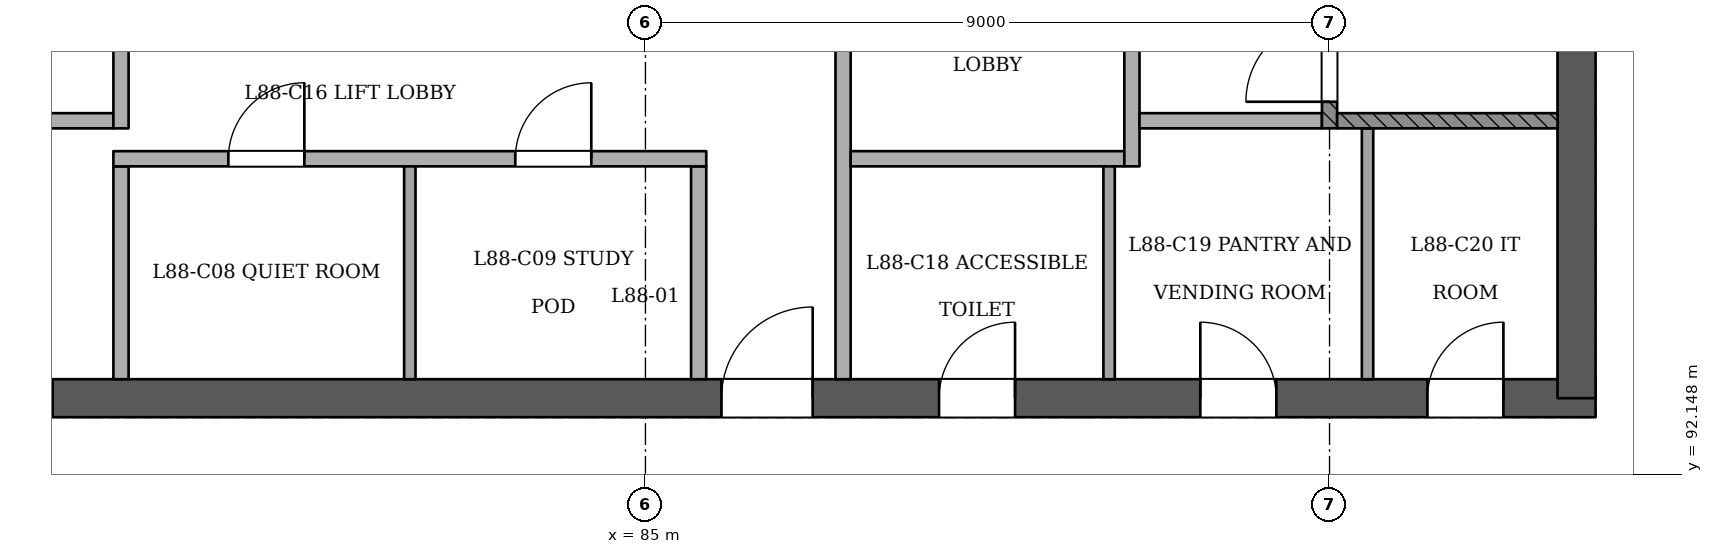
"""IFC4 building model, lengths in metres.
Left out: names, types, materials, properties, quantities, classifications, styles, units other than length and angle.
Written with IfcOpenShell. Run it as: python <this file> out.ifc"""

import sys

from ifc_helpers import new_model, si_unit, direction, frame, frame_2d, origin, place, context, subcontext, project, spatial, rectangle, extrude, element, fill, save


model = new_model("IFC4")
c1 = context("Model", 3, precision=1e-05, world=origin(), true_north=direction((0.0, 1.0)))
c2 = subcontext(c1, "Body", "Model", "MODEL_VIEW")
j1 = project(units=[si_unit("LENGTHUNIT", "METRE"), si_unit("PLANEANGLEUNIT", "RADIAN")], contexts=[c1])
p1 = place(None, origin())
s1 = spatial("IfcSite", under=j1, at=p1, CompositionType="ELEMENT")
p2 = place(p1, origin())
s2 = spatial("IfcBuilding", under=s1, at=p2, CompositionType="ELEMENT")
p3 = place(p2, frame((0.0, 0.0, 338.8)))
s3 = spatial("IfcBuildingStorey", under=s2, at=p3, CompositionType="ELEMENT", Elevation=338.8)
p4 = place(p3, frame((72.75, 93.15, 0.0), z_axis=(0.0, 0.0, 1.0), x_axis=(1.0, 0.0, 0.0)))
e1 = element("IfcWall", 1, at=p4, inside=s3, PredefinedType="SHEAR", context=c2, shape_type="SweptSolid", body=[
    extrude(rectangle(XDim=24.75, YDim=0.5, at=frame_2d((12.375, 0.0))), origin(), (0.0, 0.0, 1.0), 4.2),
])
p5 = place(p4, frame((1.05, 0.0, 0.0)))
e2 = element("IfcOpeningElement", 2, at=p5, cuts=e1, PredefinedType="OPENING", context=c2, shape_type="SweptSolid", body=[
    extrude(rectangle(XDim=1.2, YDim=2.1, at=frame_2d((0.6, 1.05))), frame((0.0, 0.26, 0.0), z_axis=(0.0, -1.0, 0.0), x_axis=(1.0, 0.0, 0.0)), (0.0, 0.0, 1.0), 0.521),
])
p6 = place(p4, frame((3.25, 0.0, 0.0)))
e3 = element("IfcOpeningElement", 3, at=p6, cuts=e1, PredefinedType="OPENING", context=c2, shape_type="SweptSolid", body=[
    extrude(rectangle(XDim=1.2, YDim=2.1, at=frame_2d((0.6, 1.05))), frame((0.0, 0.26, 0.0), z_axis=(0.0, -1.0, 0.0), x_axis=(1.0, 0.0, 0.0)), (0.0, 0.0, 1.0), 0.521),
])
p7 = place(p4, frame((13.25, 0.0, 0.0)))
e4 = element("IfcOpeningElement", 4, at=p7, cuts=e1, PredefinedType="OPENING", context=c2, shape_type="SweptSolid", body=[
    extrude(rectangle(XDim=1.2, YDim=2.1, at=frame_2d((0.6, 1.05))), frame((0.0, 0.26, 0.0), z_axis=(0.0, -1.0, 0.0), x_axis=(1.0, 0.0, 0.0)), (0.0, 0.0, 1.0), 0.521),
])
p8 = place(p4, frame((16.113, 0.0, 0.0)))
e5 = element("IfcOpeningElement", 5, at=p8, cuts=e1, PredefinedType="OPENING", context=c2, shape_type="SweptSolid", body=[
    extrude(rectangle(XDim=1.0, YDim=2.1, at=frame_2d((0.5, 1.05))), frame((0.0, 0.26, 0.0), z_axis=(0.0, -1.0, 0.0), x_axis=(1.0, 0.0, 0.0)), (0.0, 0.0, 1.0), 0.521),
])
p9 = place(p4, frame((19.55, 0.0, 0.0)))
e6 = element("IfcOpeningElement", 6, at=p9, cuts=e1, PredefinedType="OPENING", context=c2, shape_type="SweptSolid", body=[
    extrude(rectangle(XDim=1.0, YDim=2.1, at=frame_2d((0.5, 1.05))), frame((0.0, 0.26, 0.0), z_axis=(0.0, -1.0, 0.0), x_axis=(1.0, 0.0, 0.0)), (0.0, 0.0, 1.0), 0.521),
])
p10 = place(p4, frame((22.538, 0.0, 0.0)))
e7 = element("IfcOpeningElement", 7, at=p10, cuts=e1, PredefinedType="OPENING", context=c2, shape_type="SweptSolid", body=[
    extrude(rectangle(XDim=1.0, YDim=2.1, at=frame_2d((0.5, 1.05))), frame((0.0, 0.26, 0.0), z_axis=(0.0, -1.0, 0.0), x_axis=(1.0, 0.0, 0.0)), (0.0, 0.0, 1.0), 0.521),
])
p11 = place(p3, frame((97.25, 93.15, 0.0), z_axis=(0.0, 0.0, 1.0), x_axis=(0.0, 1.0, 0.0)))
e8 = element("IfcWall", 8, at=p11, inside=s3, PredefinedType="SHEAR", context=c2, shape_type="SweptSolid", body=[
    extrude(rectangle(XDim=10.75, YDim=0.5, at=frame_2d((5.375, 0.0))), origin(), (0.0, 0.0, 1.0), 4.2),
])
p12 = place(p3, frame((78.1, 93.4, 0.0), z_axis=(0.0, 0.0, 1.0), x_axis=(0.0, 1.0, 0.0)))
e9 = element("IfcWall", 9, at=p12, inside=s3, PredefinedType="PARTITIONING", context=c2, shape_type="SweptSolid", body=[
    extrude(rectangle(XDim=2.8, YDim=0.2, at=frame_2d((1.4, 0.0))), origin(), (0.0, 0.0, 1.0), 3.9),
])
p13 = place(p3, frame((81.9, 93.4, 0.0), z_axis=(0.0, 0.0, 1.0), x_axis=(0.0, 1.0, 0.0)))
e10 = element("IfcWall", 10, at=p13, inside=s3, PredefinedType="PARTITIONING", context=c2, shape_type="SweptSolid", body=[
    extrude(rectangle(XDim=2.8, YDim=0.15, at=frame_2d((1.4, 0.0))), origin(), (0.0, 0.0, 1.0), 3.9),
])
p14 = place(p3, frame((85.7, 93.4, 0.0), z_axis=(0.0, 0.0, 1.0), x_axis=(0.0, 1.0, 0.0)))
e11 = element("IfcWall", 11, at=p14, inside=s3, PredefinedType="PARTITIONING", context=c2, shape_type="SweptSolid", body=[
    extrude(rectangle(XDim=2.8, YDim=0.2, at=frame_2d((1.4, 0.0))), origin(), (0.0, 0.0, 1.0), 3.9),
])
p15 = place(p3, frame((87.6, 93.4, 0.0), z_axis=(0.0, 0.0, 1.0), x_axis=(0.0, 1.0, 0.0)))
e12 = element("IfcWall", 12, at=p15, inside=s3, PredefinedType="PARTITIONING", context=c2, shape_type="SweptSolid", body=[
    extrude(rectangle(XDim=7.0, YDim=0.2, at=frame_2d((3.5, 0.0))), origin(), (0.0, 0.0, 1.0), 3.9),
])
p16 = place(p15, frame((4.45, 0.0, 0.0)))
e13 = element("IfcOpeningElement", 13, at=p16, cuts=e12, PredefinedType="OPENING", context=c2, shape_type="SweptSolid", body=[
    extrude(rectangle(XDim=1.1, YDim=2.1, at=frame_2d((0.55, 1.05))), frame((0.0, 0.11, 0.0), z_axis=(0.0, -1.0, 0.0), x_axis=(1.0, 0.0, 0.0)), (0.0, 0.0, 1.0), 0.221),
])
p17 = place(p3, frame((91.1, 93.4, 0.0), z_axis=(0.0, 0.0, 1.0), x_axis=(0.0, 1.0, 0.0)))
e14 = element("IfcWall", 14, at=p17, inside=s3, PredefinedType="PARTITIONING", context=c2, shape_type="SweptSolid", body=[
    extrude(rectangle(XDim=2.8, YDim=0.15, at=frame_2d((1.4, 0.0))), origin(), (0.0, 0.0, 1.0), 3.9),
])
p18 = place(p3, frame((94.5, 93.4, 0.0), z_axis=(0.0, 0.0, 1.0), x_axis=(0.0, 1.0, 0.0)))
e15 = element("IfcWall", 15, at=p18, inside=s3, PredefinedType="PARTITIONING", context=c2, shape_type="SweptSolid", body=[
    extrude(rectangle(XDim=3.3, YDim=0.15, at=frame_2d((1.65, 0.0))), origin(), (0.0, 0.0, 1.0), 3.9),
])
p19 = place(p3, frame((78.0, 96.3, 0.0), z_axis=(0.0, 0.0, 1.0), x_axis=(1.0, 0.0, 0.0)))
e16 = element("IfcWall", 16, at=p19, inside=s3, PredefinedType="PARTITIONING", context=c2, shape_type="SweptSolid", body=[
    extrude(rectangle(XDim=7.8, YDim=0.2, at=frame_2d((3.9, 0.0))), origin(), (0.0, 0.0, 1.0), 3.9),
])
p20 = place(p19, frame((1.512, 0.0, 0.0)))
e17 = element("IfcOpeningElement", 17, at=p20, cuts=e16, PredefinedType="OPENING", context=c2, shape_type="SweptSolid", body=[
    extrude(rectangle(XDim=1.0, YDim=2.1, at=frame_2d((0.5, 1.05))), frame((0.0, 0.11, 0.0), z_axis=(0.0, -1.0, 0.0), x_axis=(1.0, 0.0, 0.0)), (0.0, 0.0, 1.0), 0.221),
])
p21 = place(p19, frame((5.288, 0.0, 0.0)))
e18 = element("IfcOpeningElement", 18, at=p21, cuts=e16, PredefinedType="OPENING", context=c2, shape_type="SweptSolid", body=[
    extrude(rectangle(XDim=1.0, YDim=2.1, at=frame_2d((0.5, 1.05))), frame((0.0, 0.11, 0.0), z_axis=(0.0, -1.0, 0.0), x_axis=(1.0, 0.0, 0.0)), (0.0, 0.0, 1.0), 0.221),
])
p22 = place(p3, frame((87.7, 96.3, 0.0), z_axis=(0.0, 0.0, 1.0), x_axis=(1.0, 0.0, 0.0)))
e19 = element("IfcWall", 19, at=p22, inside=s3, PredefinedType="PARTITIONING", context=c2, shape_type="SweptSolid", body=[
    extrude(rectangle(XDim=3.6, YDim=0.2, at=frame_2d((1.8, 0.0))), origin(), (0.0, 0.0, 1.0), 3.9),
])
p23 = place(p3, frame((91.4, 96.2, 0.0), z_axis=(0.0, 0.0, 1.0), x_axis=(0.0, 1.0, 0.0)))
e20 = element("IfcWall", 20, at=p23, inside=s3, PredefinedType="PARTITIONING", context=c2, shape_type="SweptSolid", body=[
    extrude(rectangle(XDim=4.2, YDim=0.2, at=frame_2d((2.1, 0.0))), origin(), (0.0, 0.0, 1.0), 3.9),
])
p24 = place(p23, frame((2.45, 0.0, 0.0)))
e21 = element("IfcOpeningElement", 21, at=p24, cuts=e20, PredefinedType="OPENING", context=c2, shape_type="SweptSolid", body=[
    extrude(rectangle(XDim=1.1, YDim=2.1, at=frame_2d((0.55, 1.05))), frame((0.0, 0.11, 0.0), z_axis=(0.0, -1.0, 0.0), x_axis=(1.0, 0.0, 0.0)), (0.0, 0.0, 1.0), 0.221),
])
p25 = place(p3, frame((76.1, 96.8, 0.0), z_axis=(0.0, 0.0, 1.0), x_axis=(1.0, 0.0, 0.0)))
e22 = element("IfcWall", 22, at=p25, inside=s3, PredefinedType="PARTITIONING", context=c2, shape_type="SweptSolid", body=[
    extrude(rectangle(XDim=1.9, YDim=0.2, at=frame_2d((0.95, 0.0))), origin(), (0.0, 0.0, 1.0), 3.9),
])
p26 = place(p3, frame((78.1, 96.7, 0.0), z_axis=(0.0, 0.0, 1.0), x_axis=(0.0, 1.0, 0.0)))
e23 = element("IfcWall", 23, at=p26, inside=s3, PredefinedType="PARTITIONING", context=c2, shape_type="SweptSolid", body=[
    extrude(rectangle(XDim=3.7, YDim=0.2, at=frame_2d((1.85, 0.0))), origin(), (0.0, 0.0, 1.0), 3.9),
])
p27 = place(p26, frame((1.95, 0.0, 0.0)))
e24 = element("IfcOpeningElement", 24, at=p27, cuts=e23, PredefinedType="OPENING", context=c2, shape_type="SweptSolid", body=[
    extrude(rectangle(XDim=1.1, YDim=2.1, at=frame_2d((0.55, 1.05))), frame((0.0, 0.11, 0.0), z_axis=(0.0, -1.0, 0.0), x_axis=(1.0, 0.0, 0.0)), (0.0, 0.0, 1.0), 0.221),
])
p28 = place(p3, frame((91.5, 96.8, 0.0), z_axis=(0.0, 0.0, 1.0), x_axis=(1.0, 0.0, 0.0)))
e25 = element("IfcWall", 25, at=p28, inside=s3, PredefinedType="PARTITIONING", context=c2, shape_type="SweptSolid", body=[
    extrude(rectangle(XDim=2.4, YDim=0.2, at=frame_2d((1.2, 0.0))), origin(), (0.0, 0.0, 1.0), 3.9),
])
p29 = place(p3, frame((94.0, 96.7, 0.0), z_axis=(0.0, 0.0, 1.0), x_axis=(0.0, 1.0, 0.0)))
e26 = element("IfcWall", 26, at=p29, inside=s3, PredefinedType="SOLIDWALL", context=c2, shape_type="SweptSolid", body=[
    extrude(rectangle(XDim=3.7, YDim=0.2, at=frame_2d((1.85, 0.0))), origin(), (0.0, 0.0, 1.0), 3.9),
])
p30 = place(p29, frame((0.35, 0.0, 0.0)))
e27 = element("IfcOpeningElement", 27, at=p30, cuts=e26, PredefinedType="OPENING", context=c2, shape_type="SweptSolid", body=[
    extrude(rectangle(XDim=1.1, YDim=2.1, at=frame_2d((0.55, 1.05))), frame((0.0, 0.11, 0.0), z_axis=(0.0, -1.0, 0.0), x_axis=(1.0, 0.0, 0.0)), (0.0, 0.0, 1.0), 0.221),
])
p31 = place(p3, frame((94.1, 96.8, 0.0), z_axis=(0.0, 0.0, 1.0), x_axis=(1.0, 0.0, 0.0)))
e28 = element("IfcWall", 28, at=p31, inside=s3, PredefinedType="SOLIDWALL", context=c2, shape_type="SweptSolid", body=[
    extrude(rectangle(XDim=2.9, YDim=0.2, at=frame_2d((1.45, 0.0))), origin(), (0.0, 0.0, 1.0), 3.9),
])
p32 = place(p30, origin())
e29 = element("IfcDoor", 29, at=p32, inside=s3, OperationType="SINGLE_SWING_LEFT", PredefinedType="NOTDEFINED", context=c2, shape_type="SweptSolid", body=[
    extrude(rectangle(XDim=1.1, YDim=2.1, at=frame_2d((0.55, 1.05))), frame((0.0, 0.025, 0.0), z_axis=(0.0, -1.0, 0.0), x_axis=(1.0, 0.0, 0.0)), (0.0, 0.0, 1.0), 0.05),
])
fill(e27, e29)
p33 = place(p6, origin())
e30 = element("IfcDoor", 30, at=p33, inside=s3, OperationType="SINGLE_SWING_LEFT", PredefinedType="NOTDEFINED", context=c2, shape_type="SweptSolid", body=[
    extrude(rectangle(XDim=1.2, YDim=2.1, at=frame_2d((0.6, 1.05))), frame((0.0, 0.025, 0.0), z_axis=(0.0, -1.0, 0.0), x_axis=(1.0, 0.0, 0.0)), (0.0, 0.0, 1.0), 0.05),
])
fill(e3, e30)
p34 = place(p7, origin())
e31 = element("IfcDoor", 31, at=p34, inside=s3, OperationType="SINGLE_SWING_RIGHT", PredefinedType="NOTDEFINED", context=c2, shape_type="SweptSolid", body=[
    extrude(rectangle(XDim=1.2, YDim=2.1, at=frame_2d((0.6, 1.05))), frame((0.0, 0.025, 0.0), z_axis=(0.0, -1.0, 0.0), x_axis=(1.0, 0.0, 0.0)), (0.0, 0.0, 1.0), 0.05),
])
fill(e4, e31)
p35 = place(p8, origin())
e32 = element("IfcDoor", 32, at=p35, inside=s3, OperationType="SINGLE_SWING_RIGHT", PredefinedType="NOTDEFINED", context=c2, shape_type="SweptSolid", body=[
    extrude(rectangle(XDim=1.0, YDim=2.1, at=frame_2d((0.5, 1.05))), frame((0.0, 0.025, 0.0), z_axis=(0.0, -1.0, 0.0), x_axis=(1.0, 0.0, 0.0)), (0.0, 0.0, 1.0), 0.05),
])
fill(e5, e32)
p36 = place(p9, origin())
e33 = element("IfcDoor", 33, at=p36, inside=s3, OperationType="SINGLE_SWING_LEFT", PredefinedType="NOTDEFINED", context=c2, shape_type="SweptSolid", body=[
    extrude(rectangle(XDim=1.0, YDim=2.1, at=frame_2d((0.5, 1.05))), frame((0.0, 0.025, 0.0), z_axis=(0.0, -1.0, 0.0), x_axis=(1.0, 0.0, 0.0)), (0.0, 0.0, 1.0), 0.05),
])
fill(e6, e33)
p37 = place(p10, origin())
e34 = element("IfcDoor", 34, at=p37, inside=s3, OperationType="SINGLE_SWING_RIGHT", PredefinedType="NOTDEFINED", context=c2, shape_type="SweptSolid", body=[
    extrude(rectangle(XDim=1.0, YDim=2.1, at=frame_2d((0.5, 1.05))), frame((0.0, 0.025, 0.0), z_axis=(0.0, -1.0, 0.0), x_axis=(1.0, 0.0, 0.0)), (0.0, 0.0, 1.0), 0.05),
])
fill(e7, e34)
p38 = place(p20, origin())
e35 = element("IfcDoor", 35, at=p38, inside=s3, OperationType="SINGLE_SWING_RIGHT", PredefinedType="NOTDEFINED", context=c2, shape_type="SweptSolid", body=[
    extrude(rectangle(XDim=1.0, YDim=2.1, at=frame_2d((0.5, 1.05))), frame((0.0, 0.025, 0.0), z_axis=(0.0, -1.0, 0.0), x_axis=(1.0, 0.0, 0.0)), (0.0, 0.0, 1.0), 0.05),
])
fill(e17, e35)
p39 = place(p21, origin())
e36 = element("IfcDoor", 36, at=p39, inside=s3, OperationType="SINGLE_SWING_RIGHT", PredefinedType="NOTDEFINED", context=c2, shape_type="SweptSolid", body=[
    extrude(rectangle(XDim=1.0, YDim=2.1, at=frame_2d((0.5, 1.05))), frame((0.0, 0.025, 0.0), z_axis=(0.0, -1.0, 0.0), x_axis=(1.0, 0.0, 0.0)), (0.0, 0.0, 1.0), 0.05),
])
fill(e18, e36)
save(model, sys.argv[1])
